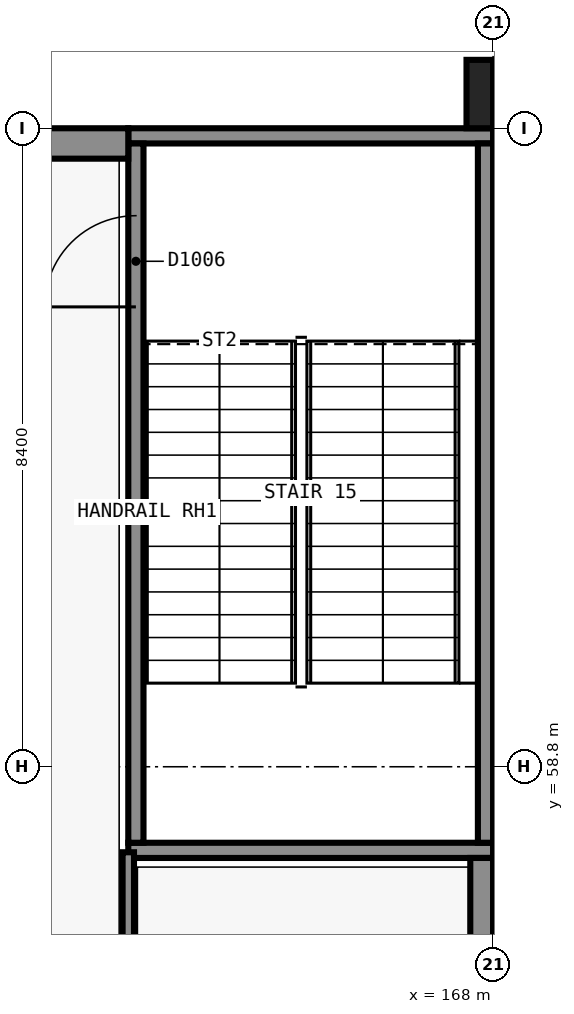
"""IFC4 building model, lengths in metres.
Left out: names, types, materials, properties, quantities, classifications, styles, units other than length and angle.
Written with IfcOpenShell. Run it as: python <this file> out.ifc"""

import sys

from ifc_helpers import new_model, si_unit, direction, frame, frame_2d, origin, origin_2d, place, context, subcontext, project, spatial, rectangle, extrude, element, fill, save


model = new_model("IFC4")
c1 = context("Model", 3, precision=1e-05, world=origin(), true_north=direction((0.0, 1.0)))
c2 = subcontext(c1, "Body", "Model", "MODEL_VIEW")
j1 = project(units=[si_unit("LENGTHUNIT", "METRE"), si_unit("PLANEANGLEUNIT", "RADIAN")], contexts=[c1])
p1 = place(None, origin())
s1 = spatial("IfcSite", under=j1, at=p1, CompositionType="ELEMENT")
p2 = place(p1, origin())
s2 = spatial("IfcBuilding", under=s1, at=p2, CompositionType="ELEMENT")
p3 = place(p2, frame((0.0, 0.0, 5.4)))
s3 = spatial("IfcBuildingStorey", under=s2, at=p3, CompositionType="ELEMENT", Elevation=5.4)
for number, where, z_axis, x_axis in (
    (1, (168.0, 57.7, 0.0), (0.0, 0.0, 1.0), (-1.0, 0.0, 0.0)),
    (2, (163.2, 67.1, 0.0), (0.0, 0.0, 1.0), (1.0, 0.0, 0.0)),
):
    element("IfcWall", number, at=place(p3, frame(where, z_axis=z_axis, x_axis=x_axis)), inside=s3, PredefinedType="SHEAR", context=c2, shape_type="SweptSolid", body=[
        extrude(rectangle(XDim=4.8, YDim=0.2, at=frame_2d((2.4, 0.0))), origin(), (0.0, 0.0, 1.0), 4.8),
    ])
p4 = place(p3, frame((163.3, 57.8, 0.0), z_axis=(0.0, 0.0, 1.0), x_axis=(0.0, 1.0, 0.0)))
e3 = element("IfcWall", 3, at=p4, inside=s3, PredefinedType="SHEAR", context=c2, shape_type="SweptSolid", body=[
    extrude(rectangle(XDim=9.2, YDim=0.2, at=frame_2d((4.6, 0.0))), origin(), (0.0, 0.0, 1.0), 4.8),
])
p5 = place(p4, frame((7.05, 0.0, 0.0)))
e4 = element("IfcOpeningElement", 4, at=p5, cuts=e3, PredefinedType="OPENING", context=c2, shape_type="SweptSolid", body=[
    extrude(rectangle(XDim=1.2, YDim=2.1, at=frame_2d((0.6, 1.05))), frame((0.0, 0.11, 0.0), z_axis=(0.0, -1.0, 0.0), x_axis=(1.0, 0.0, 0.0)), (0.0, 0.0, 1.0), 0.22),
])
p6 = place(p3, frame((167.9, 67.0, 0.0), z_axis=(0.0, 0.0, 1.0), x_axis=(0.0, -1.0, 0.0)))
e5 = element("IfcWall", 5, at=p6, inside=s3, PredefinedType="SHEAR", context=c2, shape_type="SweptSolid", body=[
    extrude(rectangle(XDim=9.2, YDim=0.2, at=frame_2d((4.6, 0.0))), origin(), (0.0, 0.0, 1.0), 4.8),
])
p7 = place(p3, frame((167.85, 57.6, 0.0), z_axis=(0.0, 0.0, 1.0), x_axis=(0.0, -1.0, 0.0)))
e6 = element("IfcWall", 6, at=p7, inside=s3, PredefinedType="SOLIDWALL", context=c2, shape_type="SweptSolid", body=[
    extrude(rectangle(XDim=14.4, YDim=0.3, at=frame_2d((7.2, 0.0))), origin(), (0.0, 0.0, 1.0), 4.8),
])
p8 = place(p3, frame((160.4, 67.0, 0.0), z_axis=(0.0, 0.0, 1.0), x_axis=(1.0, 0.0, 0.0)))
e7 = element("IfcWall", 7, at=p8, inside=s3, PredefinedType="SHEAR", context=c2, shape_type="SweptSolid", body=[
    extrude(rectangle(XDim=2.8, YDim=0.4, at=frame_2d((1.4, 0.0))), origin(), (0.0, 0.0, 1.0), 4.8),
])
p9 = place(p3, frame((167.825, 67.65, 0.0), z_axis=(0.0, 0.0, 1.0), x_axis=(1.0, 0.0, 0.0)))
e8 = element("IfcColumn", 8, at=p9, inside=s3, PredefinedType="PILASTER", context=c2, shape_type="SweptSolid", body=[
    extrude(rectangle(XDim=0.35, YDim=0.9, at=origin_2d()), origin(), (0.0, 0.0, 1.0), 4.8),
])
p10 = place(p3, frame((163.2, 43.125, 0.0), z_axis=(0.0, 0.0, 1.0), x_axis=(0.0, 1.0, 0.0)))
e9 = element("IfcWall", 9, at=p10, inside=s3, PredefinedType="PARTITIONING", context=c2, shape_type="SweptSolid", body=[
    extrude(rectangle(XDim=14.55, YDim=0.15, at=frame_2d((7.275, 0.0))), origin(), (0.0, 0.0, 1.0), 3.8),
])
p11 = place(p10, frame((6.775, 0.0, 0.0)))
e10 = element("IfcOpeningElement", 10, at=p11, cuts=e9, PredefinedType="OPENING", context=c2, shape_type="SweptSolid", body=[
    extrude(rectangle(XDim=1.0, YDim=2.1, at=frame_2d((0.5, 1.05))), frame((0.0, 0.085, 0.0), z_axis=(0.0, -1.0, 0.0), x_axis=(1.0, 0.0, 0.0)), (0.0, 0.0, 1.0), 0.17),
])
p12 = place(p5, origin())
e11 = element("IfcDoor", 11, at=p12, inside=s3, OperationType="SINGLE_SWING_RIGHT", PredefinedType="DOOR", context=c2, shape_type="SweptSolid", body=[
    extrude(rectangle(XDim=1.2, YDim=2.1, at=frame_2d((0.6, 1.05))), frame((0.0, 0.025, 0.0), z_axis=(0.0, -1.0, 0.0), x_axis=(1.0, 0.0, 0.0)), (0.0, 0.0, 1.0), 0.05),
])
fill(e4, e11)
save(model, sys.argv[1])
